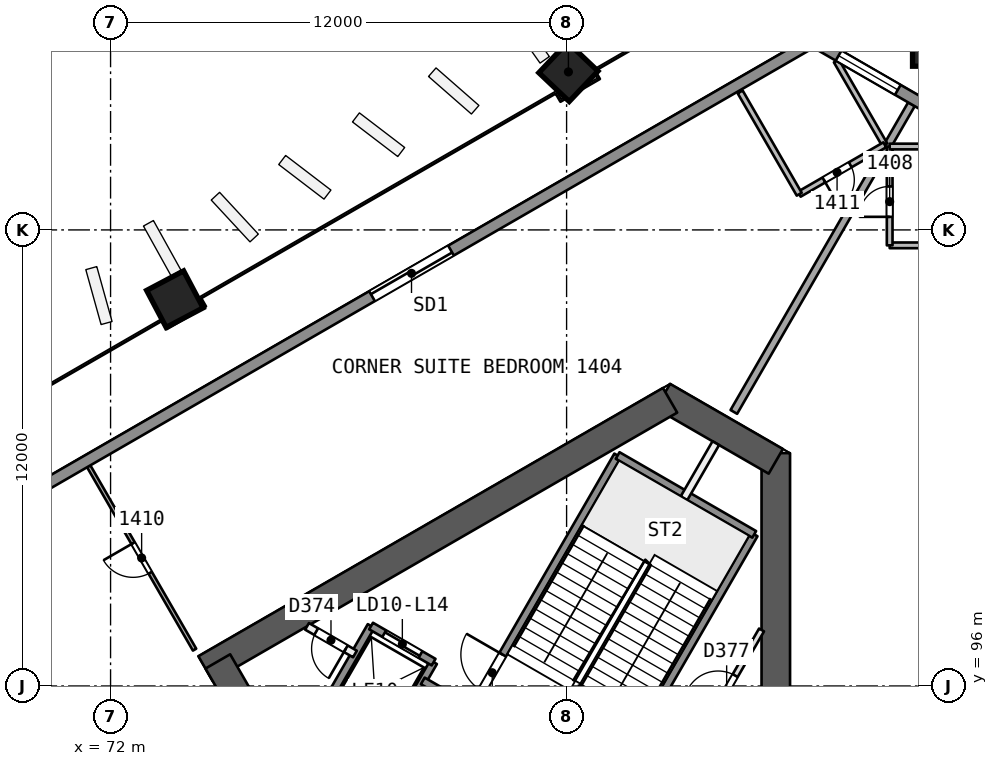
"""IFC4 building model, lengths in metres.
Left out: names, types, materials, properties, quantities, classifications, styles, units other than length and angle.
Written with IfcOpenShell. Run it as: python <this file> out.ifc"""

import sys

from ifc_helpers import new_model, si_unit, direction, frame, frame_2d, origin, origin_2d, place, context, subcontext, project, spatial, rectangle, extrude, element, fill, save


model = new_model("IFC4")
c1 = context("Model", 3, precision=1e-05, world=origin(), true_north=direction((0.0, 1.0)))
c2 = subcontext(c1, "Body", "Model", "MODEL_VIEW")
j1 = project(units=[si_unit("LENGTHUNIT", "METRE"), si_unit("PLANEANGLEUNIT", "RADIAN")], contexts=[c1])
p1 = place(None, origin())
s1 = spatial("IfcSite", under=j1, at=p1, CompositionType="ELEMENT")
p2 = place(p1, origin())
s2 = spatial("IfcBuilding", under=s1, at=p2, CompositionType="ELEMENT")
p3 = place(p2, frame((0.0, 0.0, 64.7)))
s3 = spatial("IfcBuildingStorey", under=s2, at=p3, CompositionType="ELEMENT", Elevation=64.7)
p4 = place(p3, frame((89.505, 88.169, 0.0), z_axis=(0.0, 0.0, 1.0), x_axis=(0.0, 1.0, 0.0)))
e1 = element("IfcWall", 1, at=p4, inside=s3, PredefinedType="SHEAR", context=c2, shape_type="SweptSolid", body=[
    extrude(rectangle(XDim=13.958, YDim=0.75, at=frame_2d((6.979, 0.0))), origin(), (0.0, 0.0, 1.0), 3.7),
])
p5 = place(p3, frame((89.505, 101.911, 0.0), z_axis=(0.0, 0.0, 1.0), x_axis=(-0.866017201164, 0.500014207086, 0.0)))
e2 = element("IfcWall", 2, at=p5, inside=s3, PredefinedType="SHEAR", context=c2, shape_type="SweptSolid", body=[
    extrude(rectangle(XDim=3.429, YDim=0.75, at=frame_2d((1.714, 0.0))), origin(), (0.0, 0.0, 1.0), 3.7),
])
p6 = place(p3, frame((86.723, 103.517, 0.0), z_axis=(0.0, 0.0, 1.0), x_axis=(-0.866020851292, -0.500007885066, 0.0)))
e3 = element("IfcWall", 3, at=p6, inside=s3, PredefinedType="SHEAR", context=c2, shape_type="SweptSolid", body=[
    extrude(rectangle(XDim=14.117, YDim=0.75, at=frame_2d((7.059, 0.0))), origin(), (0.0, 0.0, 1.0), 3.7),
])
p7 = place(p3, frame((74.822, 96.646, 0.0), z_axis=(0.0, 0.0, 1.0), x_axis=(0.499997052475, -0.866027105532, 0.0)))
e4 = element("IfcWall", 4, at=p7, inside=s3, PredefinedType="SHEAR", context=c2, shape_type="SweptSolid", body=[
    extrude(rectangle(XDim=10.005, YDim=0.75, at=frame_2d((5.002, 0.0))), origin(), (0.0, 0.0, 1.0), 3.7),
])
p8 = place(p7, frame((7.855, 0.0, 0.0)))
e5 = element("IfcOpeningElement", 5, at=p8, cuts=e4, PredefinedType="OPENING", context=c2, shape_type="SweptSolid", body=[
    extrude(rectangle(XDim=1.2, YDim=2.1, at=frame_2d((0.6, 1.05))), frame((0.0, 0.385, 0.0), z_axis=(0.0, -1.0, 0.0), x_axis=(1.0, 0.0, 0.0)), (0.0, 0.0, 1.0), 0.771),
])
p9 = place(p3, frame((94.424, 113.644, 0.0), z_axis=(-0.017607037296, -0.030466109479, 0.999380712447), x_axis=(0.865812389079, -0.500368770925, 1.01334e-07)))
e6 = element("IfcColumn", 6, at=p9, inside=s3, PredefinedType="COLUMN", context=c2, shape_type="SweptSolid", body=[
    extrude(rectangle(XDim=2.6, YDim=2.6, at=origin_2d()), origin(), (0.0, 0.0, 1.0), 3.702),
])
p10 = place(p3, frame((84.058, 112.191, 0.0), z_axis=(-0.00837646992, -0.028097450282, 0.999570091609), x_axis=(0.866172944967, 0.499290516463, 0.0212934163)))
e7 = element("IfcColumn", 7, at=p10, inside=s3, PredefinedType="COLUMN", context=c2, shape_type="SweptSolid", body=[
    extrude(rectangle(XDim=1.1, YDim=1.1, at=origin_2d()), origin(), (0.0, 0.0, 1.0), 3.702),
])
p11 = place(p3, frame((73.692, 106.206, 0.0), z_axis=(0.000857578916, -0.022824792675, 0.999739112668), x_axis=(0.866054076895, 0.49983648719, 0.010668737814)))
e8 = element("IfcColumn", 8, at=p11, inside=s3, PredefinedType="COLUMN", context=c2, shape_type="SweptSolid", body=[
    extrude(rectangle(XDim=1.1, YDim=1.1, at=origin_2d()), origin(), (0.0, 0.0, 1.0), 3.701),
])
p12 = place(p3, frame((95.609, 107.594, 0.0), z_axis=(0.0, 0.0, 1.0), x_axis=(-1.0, 0.0, 0.0)))
e9 = element("IfcWall", 9, at=p12, inside=s3, PredefinedType="PARTITIONING", context=c2, shape_type="SweptSolid", body=[
    extrude(rectangle(XDim=3.108, YDim=0.15, at=frame_2d((1.554, 0.0))), origin(), (0.0, 0.0, 1.0), 3.2),
])
p13 = place(p3, frame((92.501, 107.594, 0.0), z_axis=(0.0, 0.0, 1.0), x_axis=(0.0, 1.0, 0.0)))
e10 = element("IfcWall", 10, at=p13, inside=s3, PredefinedType="PARTITIONING", context=c2, shape_type="SweptSolid", body=[
    extrude(rectangle(XDim=2.6, YDim=0.15, at=frame_2d((1.3, 0.0))), origin(), (0.0, 0.0, 1.0), 3.2),
])
p14 = place(p13, frame((0.75, 0.0, 0.0)))
e11 = element("IfcOpeningElement", 11, at=p14, cuts=e10, PredefinedType="OPENING", context=c2, shape_type="SweptSolid", body=[
    extrude(rectangle(XDim=0.8, YDim=2.1, at=frame_2d((0.4, 1.05))), frame((0.0, 0.085, 0.0), z_axis=(0.0, -1.0, 0.0), x_axis=(1.0, 0.0, 0.0)), (0.0, 0.0, 1.0), 0.171),
])
p15 = place(p3, frame((92.501, 110.194, 0.0), z_axis=(0.0, 0.0, 1.0), x_axis=(1.0, 0.0, 0.0)))
e12 = element("IfcWall", 12, at=p15, inside=s3, PredefinedType="PARTITIONING", context=c2, shape_type="SweptSolid", body=[
    extrude(rectangle(XDim=2.5, YDim=0.15, at=frame_2d((1.25, 0.0))), origin(), (0.0, 0.0, 1.0), 3.2),
])
p16 = place(p3, frame((93.075, 111.306, 0.0), z_axis=(0.0, 0.0, 1.0), x_axis=(-0.49998471623, -0.866034227694, 0.0)))
e13 = element("IfcWall", 13, at=p16, inside=s3, PredefinedType="PARTITIONING", context=c2, shape_type="SweptSolid", body=[
    extrude(rectangle(XDim=9.347, YDim=0.2, at=frame_2d((4.674, 0.0))), origin(), (0.0, 0.0, 1.0), 3.2),
])
p17 = place(p3, frame((74.21, 96.956, 0.0), z_axis=(0.0, 0.0, 1.0), x_axis=(-0.499975327912, 0.866039647752, 0.0)))
e14 = element("IfcWall", 14, at=p17, inside=s3, PredefinedType="PARTITIONING", context=c2, shape_type="SweptSolid", body=[
    extrude(rectangle(XDim=5.572, YDim=0.1, at=frame_2d((2.786, 0.0))), origin(), (0.0, 0.0, 1.0), 3.2),
])
p18 = place(p17, frame((2.336, 0.0, 0.0)))
e15 = element("IfcOpeningElement", 15, at=p18, cuts=e14, PredefinedType="OPENING", context=c2, shape_type="SweptSolid", body=[
    extrude(rectangle(XDim=0.9, YDim=2.1, at=frame_2d((0.45, 1.05))), frame((0.0, 0.061, 0.0), z_axis=(0.0, -1.0, 0.0), x_axis=(1.0, 0.0, 0.0)), (0.0, 0.0, 1.0), 0.121),
])
p19 = place(p3, frame((66.025, 98.663, 0.0), z_axis=(0.0, 0.0, 1.0), x_axis=(0.499999124091, -0.86602590949, 0.0)))
e16 = element("IfcWall", 16, at=p19, inside=s3, PredefinedType="PARTITIONING", context=c2, shape_type="SweptSolid", body=[
    extrude(rectangle(XDim=9.115, YDim=0.2, at=frame_2d((4.558, 0.0))), origin(), (0.0, 0.0, 1.0), 3.2),
])
p20 = place(p3, frame((91.098, 112.448, 0.0), z_axis=(0.0, 0.0, 1.0), x_axis=(0.499960079661, -0.866048450576, 0.0)))
e17 = element("IfcWall", 17, at=p20, inside=s3, PredefinedType="PARTITIONING", context=c2, shape_type="SweptSolid", body=[
    extrude(rectangle(XDim=2.55, YDim=0.15, at=frame_2d((1.275, 0.0))), origin(), (0.0, 0.0, 1.0), 3.2),
])
p21 = place(p3, frame((92.373, 110.24, 0.0), z_axis=(0.0, 0.0, 1.0), x_axis=(-0.865997922154, -0.500047596559, 0.0)))
e18 = element("IfcWall", 18, at=p21, inside=s3, PredefinedType="PARTITIONING", context=c2, shape_type="SweptSolid", body=[
    extrude(rectangle(XDim=2.6, YDim=0.15, at=frame_2d((1.3, 0.0))), origin(), (0.0, 0.0, 1.0), 3.2),
])
p22 = place(p21, frame((1.05, 0.0, 0.0)))
e19 = element("IfcOpeningElement", 19, at=p22, cuts=e18, PredefinedType="OPENING", context=c2, shape_type="SweptSolid", body=[
    extrude(rectangle(XDim=0.8, YDim=2.1, at=frame_2d((0.4, 1.05))), frame((0.0, 0.085, 0.0), z_axis=(0.0, -1.0, 0.0), x_axis=(1.0, 0.0, 0.0)), (0.0, 0.0, 1.0), 0.171),
])
p23 = place(p3, frame((90.122, 108.939, 0.0), z_axis=(0.0, 0.0, 1.0), x_axis=(-0.500017123375, 0.866015517374, 0.0)))
e20 = element("IfcWall", 20, at=p23, inside=s3, PredefinedType="PARTITIONING", context=c2, shape_type="SweptSolid", body=[
    extrude(rectangle(XDim=3.108, YDim=0.15, at=frame_2d((1.554, 0.0))), origin(), (0.0, 0.0, 1.0), 3.2),
])
p24 = place(p3, frame((90.499, 112.966, 0.0), z_axis=(0.0, 0.0, 1.0), x_axis=(0.866022842194, -0.500004436779, 0.0)))
e21 = element("IfcWall", 21, at=p24, inside=s3, PredefinedType="SOLIDWALL", context=c2, shape_type="SweptSolid", body=[
    extrude(rectangle(XDim=6.121, YDim=0.3, at=frame_2d((3.06, 0.0))), origin(), (0.0, 0.0, 1.0), 3.2),
])
p25 = place(p24, frame((3.532, 0.0, 0.9)))
e22 = element("IfcOpeningElement", 22, at=p25, cuts=e21, PredefinedType="OPENING", context=c2, shape_type="SweptSolid", body=[
    extrude(rectangle(XDim=1.8, YDim=1.5, at=frame_2d((0.9, 0.75))), frame((0.0, 0.161, 0.0), z_axis=(0.0, -1.0, 0.0), x_axis=(1.0, 0.0, 0.0)), (0.0, 0.0, 1.0), 0.321),
])
p26 = place(p24, frame((0.76, 0.0, 0.9)))
e23 = element("IfcOpeningElement", 23, at=p26, cuts=e21, PredefinedType="OPENING", context=c2, shape_type="SweptSolid", body=[
    extrude(rectangle(XDim=1.8, YDim=1.5, at=frame_2d((0.9, 0.75))), frame((0.0, 0.161, 0.0), z_axis=(0.0, -1.0, 0.0), x_axis=(1.0, 0.0, 0.0)), (0.0, 0.0, 1.0), 0.321),
])
p27 = place(p3, frame((38.701, 83.06, 0.0), z_axis=(0.0, 0.0, 1.0), x_axis=(0.866026049211, 0.499998882086, 0.0)))
e24 = element("IfcWall", 24, at=p27, inside=s3, PredefinedType="SOLIDWALL", context=c2, shape_type="SweptSolid", body=[
    extrude(rectangle(XDim=59.811, YDim=0.3, at=frame_2d((29.905, 0.0))), origin(), (0.0, 0.0, 1.0), 3.2),
])
p28 = place(p27, frame((33.382, 0.0, 0.0)))
e25 = element("IfcOpeningElement", 25, at=p28, cuts=e24, PredefinedType="OPENING", context=c2, shape_type="SweptSolid", body=[
    extrude(rectangle(XDim=2.4, YDim=2.4, at=frame_2d((1.2, 1.2))), frame((0.0, 0.161, 0.0), z_axis=(0.0, -1.0, 0.0), x_axis=(1.0, 0.0, 0.0)), (0.0, 0.0, 1.0), 0.321),
])
p29 = place(p27, frame((46.394, 0.0, 0.0)))
e26 = element("IfcOpeningElement", 26, at=p29, cuts=e24, PredefinedType="OPENING", context=c2, shape_type="SweptSolid", body=[
    extrude(rectangle(XDim=2.4, YDim=2.4, at=frame_2d((1.2, 1.2))), frame((0.0, 0.161, 0.0), z_axis=(0.0, -1.0, 0.0), x_axis=(1.0, 0.0, 0.0)), (0.0, 0.0, 1.0), 0.321),
])
p30 = place(p27, frame((24.029, 0.0, 0.0)))
e27 = element("IfcOpeningElement", 27, at=p30, cuts=e24, PredefinedType="OPENING", context=c2, shape_type="SweptSolid", body=[
    extrude(rectangle(XDim=2.4, YDim=2.4, at=frame_2d((1.2, 1.2))), frame((0.0, 0.161, 0.0), z_axis=(0.0, -1.0, 0.0), x_axis=(1.0, 0.0, 0.0)), (0.0, 0.0, 1.0), 0.321),
])
p31 = place(p27, frame((11.002, 0.0, 0.0)))
e28 = element("IfcOpeningElement", 28, at=p31, cuts=e24, PredefinedType="OPENING", context=c2, shape_type="SweptSolid", body=[
    extrude(rectangle(XDim=2.4, YDim=2.4, at=frame_2d((1.2, 1.2))), frame((0.0, 0.161, 0.0), z_axis=(0.0, -1.0, 0.0), x_axis=(1.0, 0.0, 0.0)), (0.0, 0.0, 1.0), 0.321),
])
p32 = place(p27, frame((28.705, 0.0, 0.0)))
e29 = element("IfcOpeningElement", 29, at=p32, cuts=e24, PredefinedType="OPENING", context=c2, shape_type="SweptSolid", body=[
    extrude(rectangle(XDim=2.4, YDim=2.4, at=frame_2d((1.2, 1.2))), frame((0.0, 0.161, 0.0), z_axis=(0.0, -1.0, 0.0), x_axis=(1.0, 0.0, 0.0)), (0.0, 0.0, 1.0), 0.321),
])
p33 = place(p3, frame((87.321, 94.341, 0.0), z_axis=(0.0, 0.0, 1.0), x_axis=(0.499993116331, 0.866029378036, 0.0)))
e30 = element("IfcWall", 30, at=p33, inside=s3, PredefinedType="PARTITIONING", context=c2, shape_type="SweptSolid", body=[
    extrude(rectangle(XDim=3.618, YDim=0.15, at=frame_2d((1.809, 0.0))), origin(), (0.0, 0.0, 1.0), 3.2),
])
p34 = place(p33, frame((1.332, 0.0, 0.0)))
e31 = element("IfcOpeningElement", 31, at=p34, cuts=e30, PredefinedType="OPENING", context=c2, shape_type="SweptSolid", body=[
    extrude(rectangle(XDim=0.9, YDim=2.1, at=frame_2d((0.45, 1.05))), frame((0.0, 0.085, 0.0), z_axis=(0.0, -1.0, 0.0), x_axis=(1.0, 0.0, 0.0)), (0.0, 0.0, 1.0), 0.171),
])
p35 = place(p3, frame((85.087, 93.321, 0.0), z_axis=(0.0, 0.0, 1.0), x_axis=(0.500019787375, 0.866013979237, 0.0)))
e32 = element("IfcWall", 32, at=p35, inside=s3, PredefinedType="SOLIDWALL", context=c2, shape_type="SweptSolid", body=[
    extrude(rectangle(XDim=7.7, YDim=0.2, at=frame_2d((3.85, 0.0))), origin(), (0.0, 0.0, 1.0), 3.2),
])
p36 = place(p3, frame((87.09, 100.94, 0.0), z_axis=(0.0, 0.0, 1.0), x_axis=(0.499937194881, 0.866061661301, 0.0)))
e33 = element("IfcWall", 33, at=p36, inside=s3, PredefinedType="PARTITIONING", context=c2, shape_type="SweptSolid", body=[
    extrude(rectangle(XDim=1.673, YDim=0.2, at=frame_2d((0.836, 0.0))), origin(), (0.0, 0.0, 1.0), 3.2),
])
p37 = place(p3, frame((81.493, 95.396, 0.0), z_axis=(0.0, 0.0, 1.0), x_axis=(0.500006057782, 0.866021906294, 0.0)))
e34 = element("IfcWall", 34, at=p37, inside=s3, PredefinedType="SOLIDWALL", context=c2, shape_type="SweptSolid", body=[
    extrude(rectangle(XDim=7.7, YDim=0.2, at=frame_2d((3.85, 0.0))), origin(), (0.0, 0.0, 1.0), 3.2),
])
p38 = place(p37, frame((0.55, 0.0, 0.0)))
e35 = element("IfcOpeningElement", 35, at=p38, cuts=e34, PredefinedType="OPENING", context=c2, shape_type="SweptSolid", body=[
    extrude(rectangle(XDim=1.1, YDim=2.1, at=frame_2d((0.55, 1.05))), frame((0.0, 0.11, 0.0), z_axis=(0.0, -1.0, 0.0), x_axis=(1.0, 0.0, 0.0)), (0.0, 0.0, 1.0), 0.221),
])
for number, where, z_axis, x_axis in (
    (36, (78.976, 93.986, 0.0), (0.0, 0.0, 1.0), (0.5, 0.866, 0.0)),
    (37, (77.33, 94.936, 0.0), (0.0, 0.0, 1.0), (0.5, 0.866, 0.0)),
):
    element("IfcWall", number, at=place(p3, frame(where, z_axis=z_axis, x_axis=x_axis)), inside=s3, PredefinedType="SOLIDWALL", context=c2, shape_type="SweptSolid", body=[
        extrude(rectangle(XDim=3.05, YDim=0.2, at=frame_2d((1.525, 0.0))), origin(), (0.0, 0.0, 1.0), 3.2),
    ])
p39 = place(p3, frame((78.43, 96.841, 0.0), z_axis=(0.0, 0.0, 1.0), x_axis=(-0.866045896294, 0.499964504253, 0.0)))
e38 = element("IfcWall", 38, at=p39, inside=s3, PredefinedType="PARTITIONING", context=c2, shape_type="SweptSolid", body=[
    extrude(rectangle(XDim=1.455, YDim=0.2, at=frame_2d((0.728, 0.0))), origin(), (0.0, 0.0, 1.0), 3.2),
])
p40 = place(p39, frame((0.278, 0.0, 0.0)))
e39 = element("IfcOpeningElement", 39, at=p40, cuts=e38, PredefinedType="OPENING", context=c2, shape_type="SweptSolid", body=[
    extrude(rectangle(XDim=0.9, YDim=2.1, at=frame_2d((0.45, 1.05))), frame((0.0, 0.11, 0.0), z_axis=(0.0, -1.0, 0.0), x_axis=(1.0, 0.0, 0.0)), (0.0, 0.0, 1.0), 0.221),
])
p41 = place(p3, frame((88.01, 91.634, 0.0), z_axis=(0.0, 0.0, 1.0), x_axis=(-0.866024315419, 0.5000018851, 0.0)))
e40 = element("IfcWall", 40, at=p41, inside=s3, PredefinedType="SOLIDWALL", context=c2, shape_type="SweptSolid", body=[
    extrude(rectangle(XDim=9.0, YDim=0.2, at=frame_2d((4.5, 0.0))), origin(), (0.0, 0.0, 1.0), 3.2),
])
p42 = place(p3, frame((80.5, 96.627, 0.0), z_axis=(0.0, 0.0, 1.0), x_axis=(-0.86601224135, 0.500022797313, 0.0)))
e41 = element("IfcWall", 41, at=p42, inside=s3, PredefinedType="SOLIDWALL", context=c2, shape_type="SweptSolid", body=[
    extrude(rectangle(XDim=1.9, YDim=0.2, at=frame_2d((0.95, 0.0))), origin(), (0.0, 0.0, 1.0), 3.2),
])
p43 = place(p42, frame((0.4, 0.0, 0.0)))
e42 = element("IfcOpeningElement", 42, at=p43, cuts=e41, PredefinedType="OPENING", context=c2, shape_type="SweptSolid", body=[
    extrude(rectangle(XDim=1.1, YDim=2.1, at=frame_2d((0.55, 1.05))), frame((0.0, 0.11, 0.0), z_axis=(0.0, -1.0, 0.0), x_axis=(1.0, 0.0, 0.0)), (0.0, 0.0, 1.0), 0.221),
])
p44 = place(p3, frame((88.937, 99.99, 0.0), z_axis=(0.0, 0.0, 1.0), x_axis=(-0.866004344652, 0.500036473714, 0.0)))
e43 = element("IfcWall", 43, at=p44, inside=s3, PredefinedType="SOLIDWALL", context=c2, shape_type="SweptSolid", body=[
    extrude(rectangle(XDim=4.15, YDim=0.2, at=frame_2d((2.075, 0.0))), origin(), (0.0, 0.0, 1.0), 3.2),
])
p45 = place(p14, origin())
e44 = element("IfcDoor", 44, at=p45, inside=s3, OperationType="SINGLE_SWING_LEFT", PredefinedType="NOTDEFINED", context=c2, shape_type="SweptSolid", body=[
    extrude(rectangle(XDim=0.8, YDim=2.1, at=frame_2d((0.4, 1.05))), frame((0.0, 0.025, 0.0), z_axis=(0.0, -1.0, 0.0), x_axis=(1.0, 0.0, 0.0)), (0.0, 0.0, 1.0), 0.05),
])
fill(e11, e44)
p46 = place(p18, origin())
e45 = element("IfcDoor", 45, at=p46, inside=s3, OperationType="SINGLE_SWING_RIGHT", PredefinedType="NOTDEFINED", context=c2, shape_type="SweptSolid", body=[
    extrude(rectangle(XDim=0.9, YDim=2.1, at=frame_2d((0.45, 1.05))), frame((0.0, 0.025, 0.0), z_axis=(0.0, -1.0, 0.0), x_axis=(1.0, 0.0, 0.0)), (0.0, 0.0, 1.0), 0.05),
])
fill(e15, e45)
p47 = place(p22, origin())
e46 = element("IfcDoor", 46, at=p47, inside=s3, OperationType="SINGLE_SWING_RIGHT", PredefinedType="NOTDEFINED", context=c2, shape_type="SweptSolid", body=[
    extrude(rectangle(XDim=0.8, YDim=2.1, at=frame_2d((0.4, 1.05))), frame((0.0, 0.025, 0.0), z_axis=(0.0, -1.0, 0.0), x_axis=(1.0, 0.0, 0.0)), (0.0, 0.0, 1.0), 0.05),
])
fill(e19, e46)
p48 = place(p26, origin())
e47 = element("IfcWindow", 47, at=p48, inside=s3, PartitioningType="SINGLE_PANEL", PredefinedType="WINDOW", context=c2, shape_type="SweptSolid", body=[
    extrude(rectangle(XDim=1.8, YDim=1.5, at=frame_2d((0.9, 0.75))), frame((0.0, 0.03, 0.0), z_axis=(0.0, -1.0, 0.0), x_axis=(1.0, 0.0, 0.0)), (0.0, 0.0, 1.0), 0.06),
])
fill(e23, e47)
p49 = place(p29, origin())
e48 = element("IfcDoor", 48, at=p49, inside=s3, OperationType="SLIDING_TO_RIGHT", PredefinedType="NOTDEFINED", context=c2, shape_type="SweptSolid", body=[
    extrude(rectangle(XDim=2.4, YDim=2.4, at=frame_2d((1.2, 1.2))), frame((0.0, 0.025, 0.0), z_axis=(0.0, -1.0, 0.0), x_axis=(1.0, 0.0, 0.0)), (0.0, 0.0, 1.0), 0.05),
])
fill(e26, e48)
p50 = place(p43, origin())
e49 = element("IfcDoor", 49, at=p50, inside=s3, OperationType="SLIDING_TO_RIGHT", PredefinedType="NOTDEFINED", context=c2, shape_type="SweptSolid", body=[
    extrude(rectangle(XDim=1.1, YDim=2.1, at=frame_2d((0.55, 1.05))), frame((0.0, 0.025, 0.0), z_axis=(0.0, -1.0, 0.0), x_axis=(1.0, 0.0, 0.0)), (0.0, 0.0, 1.0), 0.05),
])
fill(e42, e49)
p51 = place(p40, origin())
e50 = element("IfcDoor", 50, at=p51, inside=s3, OperationType="SINGLE_SWING_LEFT", PredefinedType="NOTDEFINED", context=c2, shape_type="SweptSolid", body=[
    extrude(rectangle(XDim=0.9, YDim=2.1, at=frame_2d((0.45, 1.05))), frame((0.0, 0.025, 0.0), z_axis=(0.0, -1.0, 0.0), x_axis=(1.0, 0.0, 0.0)), (0.0, 0.0, 1.0), 0.05),
])
fill(e39, e50)
p52 = place(p38, origin())
e51 = element("IfcDoor", 51, at=p52, inside=s3, OperationType="SINGLE_SWING_RIGHT", PredefinedType="NOTDEFINED", context=c2, shape_type="SweptSolid", body=[
    extrude(rectangle(XDim=1.1, YDim=2.1, at=frame_2d((0.55, 1.05))), frame((0.0, 0.025, 0.0), z_axis=(0.0, -1.0, 0.0), x_axis=(1.0, 0.0, 0.0)), (0.0, 0.0, 1.0), 0.05),
])
fill(e35, e51)
p53 = place(p34, origin())
e52 = element("IfcDoor", 52, at=p53, inside=s3, OperationType="SINGLE_SWING_LEFT", PredefinedType="NOTDEFINED", context=c2, shape_type="SweptSolid", body=[
    extrude(rectangle(XDim=0.9, YDim=2.1, at=frame_2d((0.45, 1.05))), frame((0.0, 0.025, 0.0), z_axis=(0.0, -1.0, 0.0), x_axis=(1.0, 0.0, 0.0)), (0.0, 0.0, 1.0), 0.05),
])
fill(e31, e52)
save(model, sys.argv[1])
